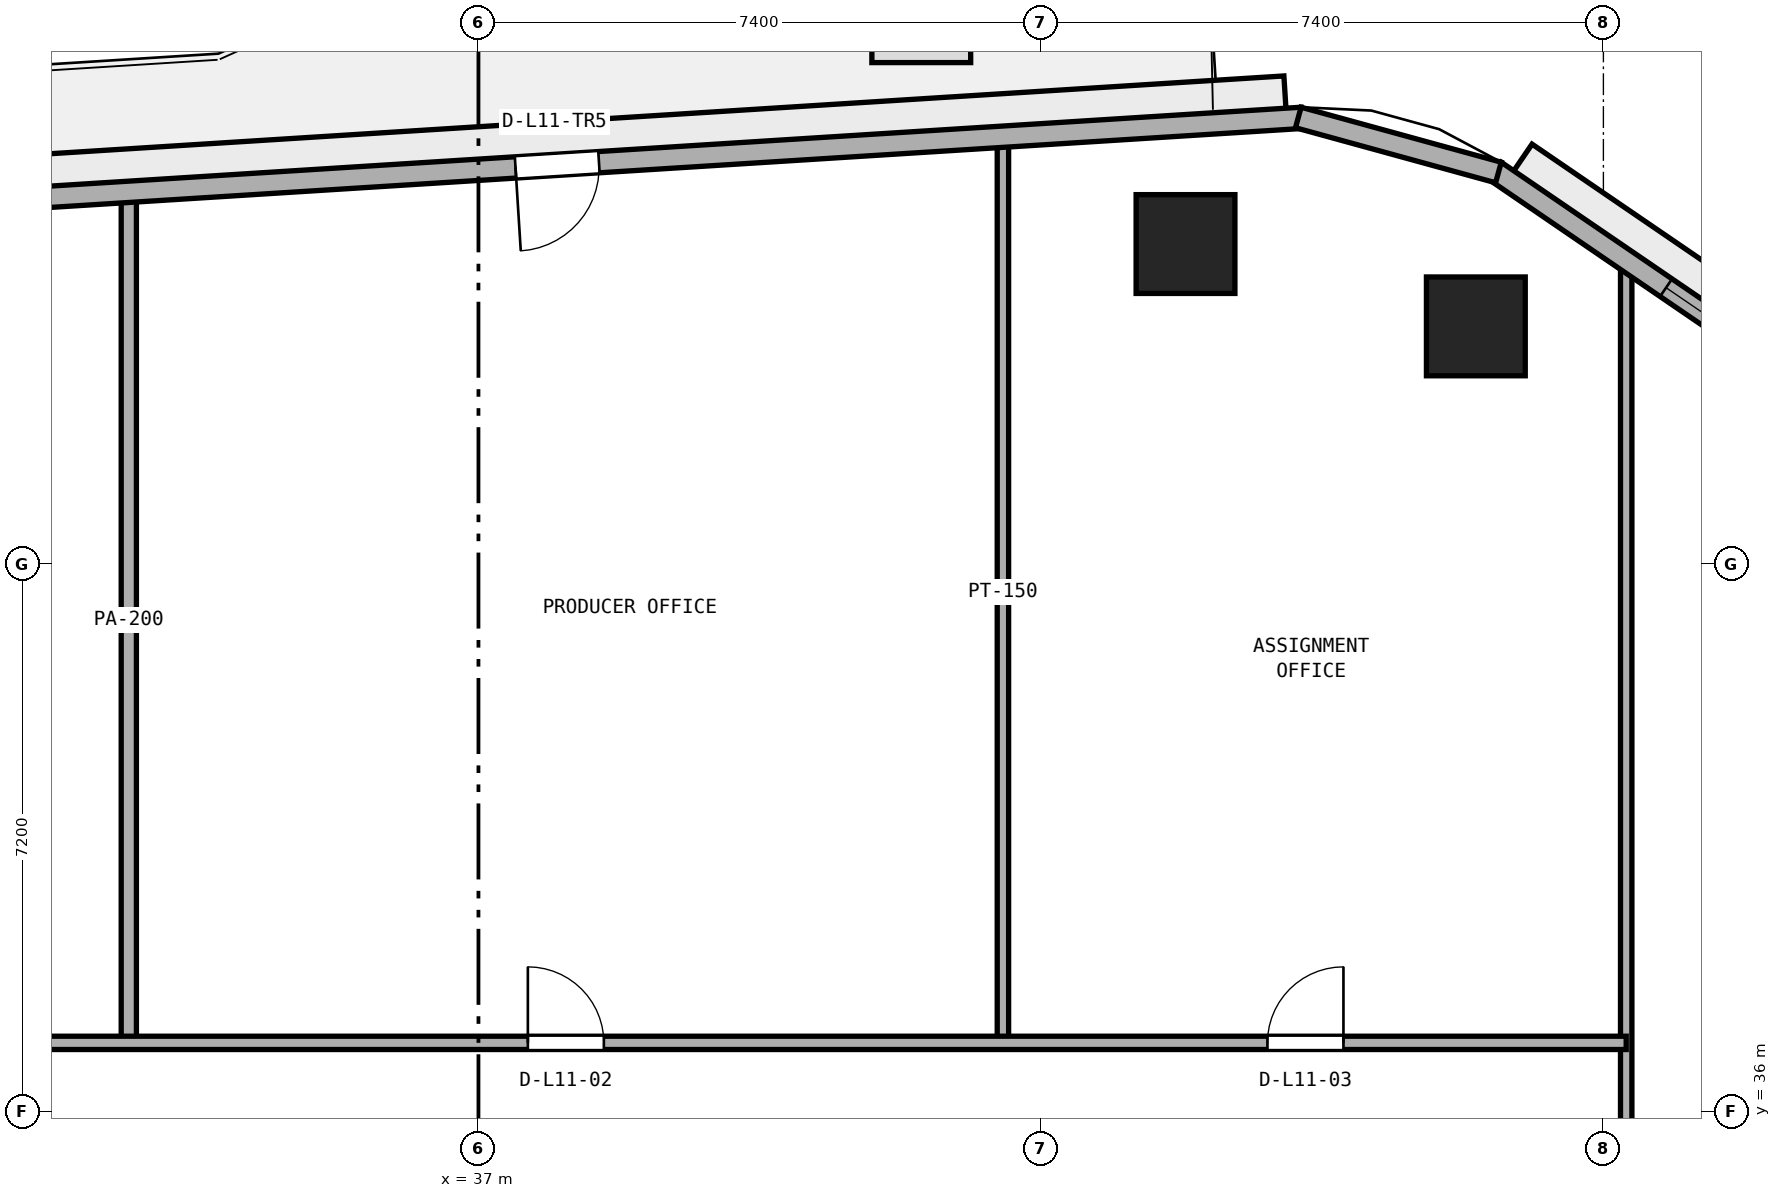
"""IFC4 building model, lengths in metres.
Left out: names, types, materials, properties, quantities, classifications, styles, units other than length and angle.
Written with IfcOpenShell. Run it as: python <this file> out.ifc"""

import sys

from ifc_helpers import new_model, si_unit, direction, frame, frame_2d, origin, origin_2d, place, context, subcontext, project, spatial, rectangle, extrude, element, fill, save


model = new_model("IFC4")
c1 = context("Model", 3, precision=1e-05, world=origin(), true_north=direction((0.0, 1.0)))
c2 = subcontext(c1, "Body", "Model", "MODEL_VIEW")
j1 = project(units=[si_unit("LENGTHUNIT", "METRE"), si_unit("PLANEANGLEUNIT", "RADIAN")], contexts=[c1])
p1 = place(None, origin())
s1 = spatial("IfcSite", under=j1, at=p1, CompositionType="ELEMENT")
p2 = place(p1, origin())
s2 = spatial("IfcBuilding", under=s1, at=p2, CompositionType="ELEMENT")
p3 = place(p2, frame((0.0, 0.0, 47.8)))
s3 = spatial("IfcBuildingStorey", under=s2, at=p3, CompositionType="ELEMENT", Elevation=47.8)
for number, where, z_axis, x_axis in (
    (1, (50.122, 46.326, 0.0), (0.0, 0.0, 1.0), (1.0, 0.0, 0.0)),
    (2, (46.302, 47.409, 0.0), (0.0, 0.0, 1.0), (1.0, 0.0, 0.0)),
):
    element("IfcColumn", number, at=place(p3, frame(where, z_axis=z_axis, x_axis=x_axis)), inside=s3, PredefinedType="COLUMN", context=c2, shape_type="SweptSolid", body=[
        extrude(rectangle(XDim=1.3, YDim=1.3, at=origin_2d()), origin(), (0.0, 0.0, 1.0), 3.8),
    ])
p4 = place(p3, frame((52.1, 13.5, 0.0), z_axis=(0.0, 0.0, 1.0), x_axis=(0.0, 1.0, 0.0)))
e3 = element("IfcWall", 3, at=p4, inside=s3, PredefinedType="PARTITIONING", context=c2, shape_type="SweptSolid", body=[
    extrude(rectangle(XDim=33.723, YDim=0.15, at=frame_2d((16.861, 0.0))), origin(), (0.0, 0.0, 1.0), 3.525),
])
p5 = place(p4, frame((4.475, 0.0, 0.0)))
e4 = element("IfcOpeningElement", 4, at=p5, cuts=e3, PredefinedType="OPENING", context=c2, shape_type="SweptSolid", body=[
    extrude(rectangle(XDim=0.9, YDim=2.1, at=frame_2d((0.45, 1.05))), frame((0.0, 0.085, 0.0), z_axis=(0.0, -1.0, 0.0), x_axis=(1.0, 0.0, 0.0)), (0.0, 0.0, 1.0), 0.17),
])
p6 = place(p4, frame((9.85, 0.0, 0.0)))
e5 = element("IfcOpeningElement", 5, at=p6, cuts=e3, PredefinedType="OPENING", context=c2, shape_type="SweptSolid", body=[
    extrude(rectangle(XDim=0.9, YDim=2.1, at=frame_2d((0.45, 1.05))), frame((0.0, 0.085, 0.0), z_axis=(0.0, -1.0, 0.0), x_axis=(1.0, 0.0, 0.0)), (0.0, 0.0, 1.0), 0.17),
])
p7 = place(p4, frame((18.4, 0.0, 0.0)))
e6 = element("IfcOpeningElement", 6, at=p7, cuts=e3, PredefinedType="OPENING", context=c2, shape_type="SweptSolid", body=[
    extrude(rectangle(XDim=0.9, YDim=2.1, at=frame_2d((0.45, 1.05))), frame((0.0, 0.085, 0.0), z_axis=(0.0, -1.0, 0.0), x_axis=(1.0, 0.0, 0.0)), (0.0, 0.0, 1.0), 0.17),
])
p8 = place(p3, frame((43.9, 36.9, 0.0), z_axis=(0.0, 0.0, 1.0), x_axis=(0.0, 1.0, 0.0)))
e7 = element("IfcWall", 7, at=p8, inside=s3, PredefinedType="PARTITIONING", context=c2, shape_type="SweptSolid", body=[
    extrude(rectangle(XDim=11.857, YDim=0.15, at=frame_2d((5.928, 0.0))), origin(), (0.0, 0.0, 1.0), 3.525),
])
p9 = place(p3, frame((32.4, 36.901, 0.0), z_axis=(0.0, 0.0, 1.0), x_axis=(0.0, 1.0, 0.0)))
e8 = element("IfcWall", 8, at=p9, inside=s3, PredefinedType="PARTITIONING", context=c2, shape_type="SweptSolid", body=[
    extrude(rectangle(XDim=11.131, YDim=0.2, at=frame_2d((5.565, 0.0))), origin(), (0.0, 0.0, 1.0), 3.525),
])
p10 = place(p3, frame((21.9, 36.9, 0.0), z_axis=(0.0, 0.0, 1.0), x_axis=(1.0, 0.0, 0.0)))
e9 = element("IfcWall", 9, at=p10, inside=s3, PredefinedType="PARTITIONING", context=c2, shape_type="SweptSolid", body=[
    extrude(rectangle(XDim=30.2, YDim=0.175, at=frame_2d((15.1, 0.0))), origin(), (0.0, 0.0, 1.0), 3.525),
])
p11 = place(p10, frame((4.87, 0.0, 0.0)))
e10 = element("IfcOpeningElement", 10, at=p11, cuts=e9, PredefinedType="OPENING", context=c2, shape_type="SweptSolid", body=[
    extrude(rectangle(XDim=1.0, YDim=2.12, at=frame_2d((0.5, 1.06))), frame((0.0, 0.097, 0.0), z_axis=(0.0, -1.0, 0.0), x_axis=(1.0, 0.0, 0.0)), (0.0, 0.0, 1.0), 0.195),
])
p12 = place(p10, frame((15.75, 0.0, 0.0)))
e11 = element("IfcOpeningElement", 11, at=p12, cuts=e9, PredefinedType="OPENING", context=c2, shape_type="SweptSolid", body=[
    extrude(rectangle(XDim=1.0, YDim=2.12, at=frame_2d((0.5, 1.06))), frame((0.0, 0.097, 0.0), z_axis=(0.0, -1.0, 0.0), x_axis=(1.0, 0.0, 0.0)), (0.0, 0.0, 1.0), 0.195),
])
p13 = place(p10, frame((25.48, 0.0, 0.0)))
e12 = element("IfcOpeningElement", 12, at=p13, cuts=e9, PredefinedType="OPENING", context=c2, shape_type="SweptSolid", body=[
    extrude(rectangle(XDim=1.0, YDim=2.12, at=frame_2d((0.5, 1.06))), frame((0.0, 0.097, 0.0), z_axis=(0.0, -1.0, 0.0), x_axis=(1.0, 0.0, 0.0)), (0.0, 0.0, 1.0), 0.195),
])
p14 = place(p3, frame((64.29, 38.867, 0.0), z_axis=(0.0, 0.0, 1.0), x_axis=(-0.825755550159, 0.564028165416, 0.0)))
e13 = element("IfcWall", 13, at=p14, inside=s3, PredefinedType="STANDARD", context=c2, shape_type="SweptSolid", body=[
    extrude(rectangle(XDim=16.848, YDim=0.28, at=frame_2d((8.424, 0.0))), origin(), (0.0, 0.0, 1.0), 3.525),
])
p15 = place(p14, frame((1.941, 0.0, 0.9)))
e14 = element("IfcOpeningElement", 14, at=p15, cuts=e13, PredefinedType="OPENING", context=c2, shape_type="SweptSolid", body=[
    extrude(rectangle(XDim=2.4, YDim=1.75, at=frame_2d((1.2, 0.875))), frame((0.0, 0.15, 0.0), z_axis=(0.0, -1.0, 0.0), x_axis=(1.0, 0.0, 0.0)), (0.0, 0.0, 1.0), 0.3),
])
p16 = place(p14, frame((7.224, 0.0, 0.9)))
e15 = element("IfcOpeningElement", 15, at=p16, cuts=e13, PredefinedType="OPENING", context=c2, shape_type="SweptSolid", body=[
    extrude(rectangle(XDim=2.4, YDim=1.75, at=frame_2d((1.2, 0.875))), frame((0.0, 0.15, 0.0), z_axis=(0.0, -1.0, 0.0), x_axis=(1.0, 0.0, 0.0)), (0.0, 0.0, 1.0), 0.3),
])
p17 = place(p14, frame((11.727, 0.0, 0.9)))
e16 = element("IfcOpeningElement", 16, at=p17, cuts=e13, PredefinedType="OPENING", context=c2, shape_type="SweptSolid", body=[
    extrude(rectangle(XDim=2.4, YDim=1.75, at=frame_2d((1.2, 0.875))), frame((0.0, 0.15, 0.0), z_axis=(0.0, -1.0, 0.0), x_axis=(1.0, 0.0, 0.0)), (0.0, 0.0, 1.0), 0.3),
])
p18 = place(p3, frame((47.832, 49.069, 0.0), z_axis=(0.0, 0.0, 1.0), x_axis=(-0.998017725054, -0.062933460723, 0.0)))
e17 = element("IfcWall", 17, at=p18, inside=s3, PredefinedType="STANDARD", context=c2, shape_type="SweptSolid", body=[
    extrude(rectangle(XDim=19.629, YDim=0.28, at=frame_2d((9.815, 0.0))), origin(), (0.0, 0.0, 1.0), 3.525),
])
p19 = place(p18, frame((9.265, 0.0, 0.0)))
e18 = element("IfcOpeningElement", 18, at=p19, cuts=e17, PredefinedType="OPENING", context=c2, shape_type="SweptSolid", body=[
    extrude(rectangle(XDim=1.1, YDim=2.2, at=frame_2d((0.55, 1.1))), frame((0.0, 0.15, 0.0), z_axis=(0.0, -1.0, 0.0), x_axis=(1.0, 0.0, 0.0)), (0.0, 0.0, 1.0), 0.3),
])
p20 = place(p3, frame((50.419, 48.351, 0.0), z_axis=(0.0, 0.0, 1.0), x_axis=(-0.964254516967, 0.264977784933, 0.0)))
e19 = element("IfcWall", 19, at=p20, inside=s3, PredefinedType="STANDARD", context=c2, shape_type="SweptSolid", body=[
    extrude(rectangle(XDim=2.731, YDim=0.28, at=frame_2d((1.365, 0.0))), origin(), (0.0, 0.0, 1.0), 3.525),
])
p21 = place(p12, origin())
e20 = element("IfcDoor", 20, at=p21, inside=s3, OperationType="SINGLE_SWING_LEFT", PredefinedType="DOOR", context=c2, shape_type="SweptSolid", body=[
    extrude(rectangle(XDim=1.0, YDim=2.12, at=frame_2d((0.5, 1.06))), frame((0.0, 0.025, 0.0), z_axis=(0.0, -1.0, 0.0), x_axis=(1.0, 0.0, 0.0)), (0.0, 0.0, 1.0), 0.05),
])
fill(e11, e20)
p22 = place(p13, origin())
e21 = element("IfcDoor", 21, at=p22, inside=s3, OperationType="SINGLE_SWING_RIGHT", PredefinedType="DOOR", context=c2, shape_type="SweptSolid", body=[
    extrude(rectangle(XDim=1.0, YDim=2.12, at=frame_2d((0.5, 1.06))), frame((0.0, 0.025, 0.0), z_axis=(0.0, -1.0, 0.0), x_axis=(1.0, 0.0, 0.0)), (0.0, 0.0, 1.0), 0.05),
])
fill(e12, e21)
p23 = place(p17, origin())
e22 = element("IfcWindow", 22, at=p23, inside=s3, PartitioningType="SINGLE_PANEL", PredefinedType="WINDOW", context=c2, shape_type="SweptSolid", body=[
    extrude(rectangle(XDim=2.4, YDim=1.75, at=frame_2d((1.2, 0.875))), frame((0.0, 0.03, 0.0), z_axis=(0.0, -1.0, 0.0), x_axis=(1.0, 0.0, 0.0)), (0.0, 0.0, 1.0), 0.06),
])
fill(e16, e22)
p24 = place(p19, origin())
e23 = element("IfcDoor", 23, at=p24, inside=s3, OperationType="SINGLE_SWING_RIGHT", PredefinedType="DOOR", context=c2, shape_type="SweptSolid", body=[
    extrude(rectangle(XDim=1.1, YDim=2.2, at=frame_2d((0.55, 1.1))), frame((0.0, 0.025, 0.0), z_axis=(0.0, -1.0, 0.0), x_axis=(1.0, 0.0, 0.0)), (0.0, 0.0, 1.0), 0.05),
])
fill(e18, e23)
save(model, sys.argv[1])
